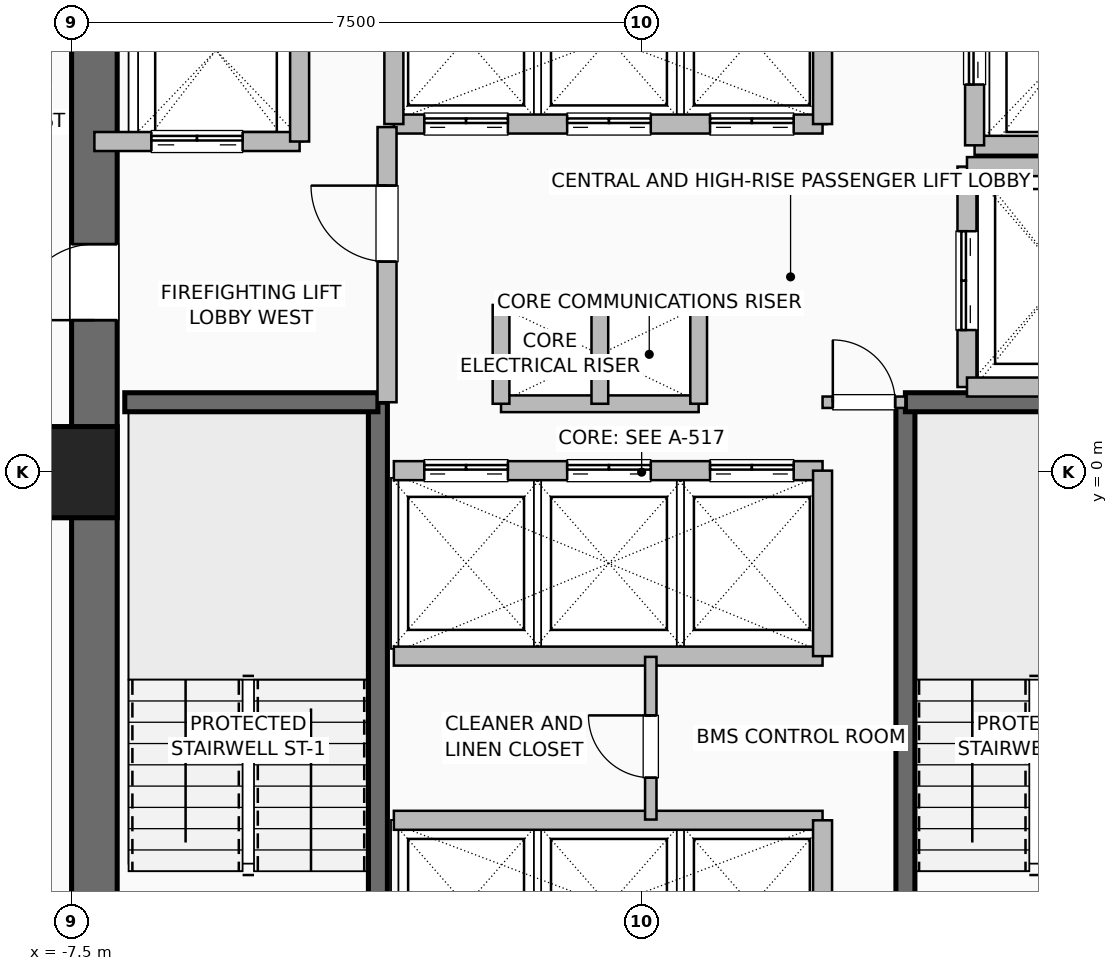
"""IFC4 building model, lengths in metres.
Left out: names, types, materials, properties, quantities, classifications, styles, units other than length and angle.
Written with IfcOpenShell. Run it as: python <this file> out.ifc"""

import sys

from ifc_helpers import new_model, si_unit, direction, frame, frame_2d, origin, origin_2d, place, context, subcontext, project, spatial, rectangle, hollow_rectangle, extrude, element, fill, save


model = new_model("IFC4")
c1 = context("Model", 3, precision=1e-05, world=origin(), true_north=direction((0.0, 1.0)))
c2 = subcontext(c1, "Body", "Model", "MODEL_VIEW")
j1 = project(units=[si_unit("LENGTHUNIT", "METRE"), si_unit("PLANEANGLEUNIT", "RADIAN")], contexts=[c1])
p1 = place(None, origin())
s1 = spatial("IfcSite", under=j1, at=p1, CompositionType="ELEMENT")
p2 = place(p1, origin())
s2 = spatial("IfcBuilding", under=s1, at=p2, CompositionType="ELEMENT")
p3 = place(p2, frame((0.0, 0.0, 65.5)))
s3 = spatial("IfcBuildingStorey", under=s2, at=p3, CompositionType="ELEMENT", Elevation=65.5)
p4 = place(p3, frame((-7.5, 0.0, 0.0), z_axis=(0.0, 0.0, 1.0), x_axis=(1.0, 0.0, 0.0)))
e1 = element("IfcColumn", 1, at=p4, inside=s3, PredefinedType="COLUMN", context=c2, shape_type="SweptSolid", body=[
    extrude(hollow_rectangle(XDim=1.2, YDim=1.2, WallThickness=0.055, at=origin_2d()), origin(), (0.0, 0.0, 1.0), 3.5),
])
p5 = place(p3, frame((-7.2, -7.5, 0.0), z_axis=(0.0, 0.0, 1.0), x_axis=(0.0, 1.0, 0.0)))
e2 = element("IfcWall", 2, at=p5, inside=s3, PredefinedType="SHEAR", context=c2, shape_type="SweptSolid", body=[
    extrude(rectangle(XDim=15.0, YDim=0.6, at=frame_2d((7.5, 0.0))), origin(), (0.0, 0.0, 1.0), 3.25),
])
p6 = place(p5, frame((9.5, 0.0, 0.0)))
e3 = element("IfcOpeningElement", 3, at=p6, cuts=e2, PredefinedType="OPENING", context=c2, shape_type="SweptSolid", body=[
    extrude(rectangle(XDim=1.0, YDim=2.08, at=frame_2d((0.5, 1.04))), frame((0.0, 0.31, 0.0), z_axis=(0.0, -1.0, 0.0), x_axis=(1.0, 0.0, 0.0)), (0.0, 0.0, 1.0), 0.62),
])
p7 = place(p3, frame((-3.47, -6.8, 0.0), z_axis=(0.0, 0.0, 1.0), x_axis=(0.0, 1.0, 0.0)))
e4 = element("IfcWall", 4, at=p7, inside=s3, PredefinedType="SHEAR", context=c2, shape_type="SweptSolid", body=[
    extrude(rectangle(XDim=7.72, YDim=0.25, at=frame_2d((3.86, 0.0))), origin(), (0.0, 0.0, 1.0), 3.25),
])
p8 = place(p3, frame((-6.8, 0.92, 0.0), z_axis=(0.0, 0.0, 1.0), x_axis=(1.0, 0.0, 0.0)))
e5 = element("IfcWall", 5, at=p8, inside=s3, PredefinedType="SHEAR", context=c2, shape_type="SweptSolid", body=[
    extrude(rectangle(XDim=3.33, YDim=0.25, at=frame_2d((1.665, 0.0))), origin(), (0.0, 0.0, 1.0), 3.25),
])
p9 = place(p3, frame((3.47, -6.8, 0.0), z_axis=(0.0, 0.0, 1.0), x_axis=(0.0, 1.0, 0.0)))
e6 = element("IfcWall", 6, at=p9, inside=s3, PredefinedType="SHEAR", context=c2, shape_type="SweptSolid", body=[
    extrude(rectangle(XDim=7.72, YDim=0.25, at=frame_2d((3.86, 0.0))), origin(), (0.0, 0.0, 1.0), 3.25),
])
p10 = place(p3, frame((3.47, 0.92, 0.0), z_axis=(0.0, 0.0, 1.0), x_axis=(1.0, 0.0, 0.0)))
e7 = element("IfcWall", 7, at=p10, inside=s3, PredefinedType="SHEAR", context=c2, shape_type="SweptSolid", body=[
    extrude(rectangle(XDim=3.33, YDim=0.25, at=frame_2d((1.665, 0.0))), origin(), (0.0, 0.0, 1.0), 3.25),
])
for number, where, z_axis, x_axis in (
    (8, (-1.85, 2.2, 0.0), (0.0, 0.0, 1.0), (1.0, 0.0, 0.0)),
    (9, (-1.85, 0.9, 0.0), (0.0, 0.0, 1.0), (1.0, 0.0, 0.0)),
):
    element("IfcWall", number, at=place(p3, frame(where, z_axis=z_axis, x_axis=x_axis)), inside=s3, PredefinedType="PARTITIONING", context=c2, shape_type="SweptSolid", body=[
        extrude(rectangle(XDim=2.6, YDim=0.22, at=frame_2d((1.3, 0.0))), origin(), (0.0, 0.0, 1.0), 3.25),
    ])
for number, where, z_axis, x_axis in (
    (10, (-0.55, 0.9, 0.0), (0.0, 0.0, 1.0), (0.0, 1.0, 0.0)),
    (11, (0.75, 0.9, 0.0), (0.0, 0.0, 1.0), (0.0, 1.0, 0.0)),
    (12, (-1.85, 0.9, 0.0), (0.0, 0.0, 1.0), (0.0, 1.0, 0.0)),
):
    element("IfcWall", number, at=place(p3, frame(where, z_axis=z_axis, x_axis=x_axis)), inside=s3, PredefinedType="PARTITIONING", context=c2, shape_type="SweptSolid", body=[
        extrude(rectangle(XDim=1.3, YDim=0.22, at=frame_2d((0.65, 0.0))), origin(), (0.0, 0.0, 1.0), 3.25),
    ])
p11 = place(p3, frame((-3.26, -4.58, 0.0), z_axis=(0.0, 0.0, 1.0), x_axis=(1.0, 0.0, 0.0)))
e13 = element("IfcWall", 13, at=p11, inside=s3, PredefinedType="SHEAR", context=c2, shape_type="SweptSolid", body=[
    extrude(rectangle(XDim=5.64, YDim=0.25, at=frame_2d((2.82, 0.0))), origin(), (0.0, 0.0, 1.0), 3.25),
])
p12 = place(p3, frame((2.38, -6.8, 0.0), z_axis=(0.0, 0.0, 1.0), x_axis=(0.0, 1.0, 0.0)))
e14 = element("IfcWall", 14, at=p12, inside=s3, PredefinedType="SHEAR", context=c2, shape_type="SweptSolid", body=[
    extrude(rectangle(XDim=2.22, YDim=0.25, at=frame_2d((1.11, 0.0))), origin(), (0.0, 0.0, 1.0), 3.25),
])
p13 = place(p3, frame((-3.26, 0.02, 0.0), z_axis=(0.0, 0.0, 1.0), x_axis=(1.0, 0.0, 0.0)))
e15 = element("IfcWall", 15, at=p13, inside=s3, PredefinedType="SHEAR", context=c2, shape_type="SweptSolid", body=[
    extrude(rectangle(XDim=5.64, YDim=0.25, at=frame_2d((2.82, 0.0))), origin(), (0.0, 0.0, 1.0), 3.25),
])
p14 = place(p13, frame((0.4, 0.0, 0.0)))
e16 = element("IfcOpeningElement", 16, at=p14, cuts=e15, PredefinedType="OPENING", context=c2, shape_type="SweptSolid", body=[
    extrude(rectangle(XDim=1.1, YDim=2.2, at=frame_2d((0.55, 1.1))), frame((0.0, 0.135, 0.0), z_axis=(0.0, -1.0, 0.0), x_axis=(1.0, 0.0, 0.0)), (0.0, 0.0, 1.0), 0.27),
])
p15 = place(p13, frame((2.28, 0.0, 0.0)))
e17 = element("IfcOpeningElement", 17, at=p15, cuts=e15, PredefinedType="OPENING", context=c2, shape_type="SweptSolid", body=[
    extrude(rectangle(XDim=1.1, YDim=2.2, at=frame_2d((0.55, 1.1))), frame((0.0, 0.135, 0.0), z_axis=(0.0, -1.0, 0.0), x_axis=(1.0, 0.0, 0.0)), (0.0, 0.0, 1.0), 0.27),
])
p16 = place(p13, frame((4.16, 0.0, 0.0)))
e18 = element("IfcOpeningElement", 18, at=p16, cuts=e15, PredefinedType="OPENING", context=c2, shape_type="SweptSolid", body=[
    extrude(rectangle(XDim=1.1, YDim=2.2, at=frame_2d((0.55, 1.1))), frame((0.0, 0.135, 0.0), z_axis=(0.0, -1.0, 0.0), x_axis=(1.0, 0.0, 0.0)), (0.0, 0.0, 1.0), 0.27),
])
p17 = place(p3, frame((-3.26, -2.42, 0.0), z_axis=(0.0, 0.0, 1.0), x_axis=(1.0, 0.0, 0.0)))
e19 = element("IfcWall", 19, at=p17, inside=s3, PredefinedType="SHEAR", context=c2, shape_type="SweptSolid", body=[
    extrude(rectangle(XDim=5.64, YDim=0.25, at=frame_2d((2.82, 0.0))), origin(), (0.0, 0.0, 1.0), 3.25),
])
p18 = place(p3, frame((2.38, -2.42, 0.0), z_axis=(0.0, 0.0, 1.0), x_axis=(0.0, 1.0, 0.0)))
e20 = element("IfcWall", 20, at=p18, inside=s3, PredefinedType="SHEAR", context=c2, shape_type="SweptSolid", body=[
    extrude(rectangle(XDim=2.44, YDim=0.25, at=frame_2d((1.22, 0.0))), origin(), (0.0, 0.0, 1.0), 3.25),
])
p19 = place(p3, frame((-3.26, 4.58, 0.0), z_axis=(0.0, 0.0, 1.0), x_axis=(1.0, 0.0, 0.0)))
e21 = element("IfcWall", 21, at=p19, inside=s3, PredefinedType="SHEAR", context=c2, shape_type="SweptSolid", body=[
    extrude(rectangle(XDim=5.64, YDim=0.25, at=frame_2d((2.82, 0.0))), origin(), (0.0, 0.0, 1.0), 3.25),
])
p20 = place(p19, frame((0.4, 0.0, 0.0)))
e22 = element("IfcOpeningElement", 22, at=p20, cuts=e21, PredefinedType="OPENING", context=c2, shape_type="SweptSolid", body=[
    extrude(rectangle(XDim=1.1, YDim=2.2, at=frame_2d((0.55, 1.1))), frame((0.0, 0.135, 0.0), z_axis=(0.0, -1.0, 0.0), x_axis=(1.0, 0.0, 0.0)), (0.0, 0.0, 1.0), 0.27),
])
p21 = place(p19, frame((2.28, 0.0, 0.0)))
e23 = element("IfcOpeningElement", 23, at=p21, cuts=e21, PredefinedType="OPENING", context=c2, shape_type="SweptSolid", body=[
    extrude(rectangle(XDim=1.1, YDim=2.2, at=frame_2d((0.55, 1.1))), frame((0.0, 0.135, 0.0), z_axis=(0.0, -1.0, 0.0), x_axis=(1.0, 0.0, 0.0)), (0.0, 0.0, 1.0), 0.27),
])
p22 = place(p19, frame((4.16, 0.0, 0.0)))
e24 = element("IfcOpeningElement", 24, at=p22, cuts=e21, PredefinedType="OPENING", context=c2, shape_type="SweptSolid", body=[
    extrude(rectangle(XDim=1.1, YDim=2.2, at=frame_2d((0.55, 1.1))), frame((0.0, 0.135, 0.0), z_axis=(0.0, -1.0, 0.0), x_axis=(1.0, 0.0, 0.0)), (0.0, 0.0, 1.0), 0.27),
])
for number, where, z_axis, x_axis in (
    (25, (-3.26, 4.58, 0.0), (0.0, 0.0, 1.0), (0.0, 1.0, 0.0)),
    (26, (2.38, 4.58, 0.0), (0.0, 0.0, 1.0), (0.0, 1.0, 0.0)),
):
    element("IfcWall", number, at=place(p3, frame(where, z_axis=z_axis, x_axis=x_axis)), inside=s3, PredefinedType="SHEAR", context=c2, shape_type="SweptSolid", body=[
        extrude(rectangle(XDim=2.22, YDim=0.25, at=frame_2d((1.11, 0.0))), origin(), (0.0, 0.0, 1.0), 3.25),
    ])
p23 = place(p3, frame((-7.2, 4.35, 0.0), z_axis=(0.0, 0.0, 1.0), x_axis=(1.0, 0.0, 0.0)))
e27 = element("IfcWall", 27, at=p23, inside=s3, PredefinedType="SHEAR", context=c2, shape_type="SweptSolid", body=[
    extrude(rectangle(XDim=2.7, YDim=0.25, at=frame_2d((1.35, 0.0))), origin(), (0.0, 0.0, 1.0), 3.25),
])
p24 = place(p23, frame((0.75, 0.0, 0.0)))
e28 = element("IfcOpeningElement", 28, at=p24, cuts=e27, PredefinedType="OPENING", context=c2, shape_type="SweptSolid", body=[
    extrude(rectangle(XDim=1.2, YDim=2.2, at=frame_2d((0.6, 1.1))), frame((0.0, 0.135, 0.0), z_axis=(0.0, -1.0, 0.0), x_axis=(1.0, 0.0, 0.0)), (0.0, 0.0, 1.0), 0.27),
])
p25 = place(p3, frame((-4.5, 4.35, 0.0), z_axis=(0.0, 0.0, 1.0), x_axis=(0.0, 1.0, 0.0)))
e29 = element("IfcWall", 29, at=p25, inside=s3, PredefinedType="SHEAR", context=c2, shape_type="SweptSolid", body=[
    extrude(rectangle(XDim=2.85, YDim=0.25, at=frame_2d((1.425, 0.0))), origin(), (0.0, 0.0, 1.0), 3.25),
])
p26 = place(p3, frame((4.38, 4.3, 0.0), z_axis=(0.0, 0.0, 1.0), x_axis=(1.0, 0.0, 0.0)))
e30 = element("IfcWall", 30, at=p26, inside=s3, PredefinedType="SHEAR", context=c2, shape_type="SweptSolid", body=[
    extrude(rectangle(XDim=2.42, YDim=0.25, at=frame_2d((1.21, 0.0))), origin(), (0.0, 0.0, 1.0), 3.25),
])
p27 = place(p3, frame((4.38, 4.3, 0.0), z_axis=(0.0, 0.0, 1.0), x_axis=(0.0, 1.0, 0.0)))
e31 = element("IfcWall", 31, at=p27, inside=s3, PredefinedType="SHEAR", context=c2, shape_type="SweptSolid", body=[
    extrude(rectangle(XDim=2.5, YDim=0.25, at=frame_2d((1.25, 0.0))), origin(), (0.0, 0.0, 1.0), 3.25),
])
p28 = place(p27, frame((0.8, 0.0, 0.0)))
e32 = element("IfcOpeningElement", 32, at=p28, cuts=e31, PredefinedType="OPENING", context=c2, shape_type="SweptSolid", body=[
    extrude(rectangle(XDim=1.2, YDim=2.2, at=frame_2d((0.6, 1.1))), frame((0.0, 0.135, 0.0), z_axis=(0.0, -1.0, 0.0), x_axis=(1.0, 0.0, 0.0)), (0.0, 0.0, 1.0), 0.27),
])
p29 = place(p3, frame((4.28, 1.12, 0.0), z_axis=(0.0, 0.0, 1.0), x_axis=(0.0, 1.0, 0.0)))
e33 = element("IfcWall", 33, at=p29, inside=s3, PredefinedType="SHEAR", context=c2, shape_type="SweptSolid", body=[
    extrude(rectangle(XDim=2.9, YDim=0.25, at=frame_2d((1.45, 0.0))), origin(), (0.0, 0.0, 1.0), 3.25),
])
p30 = place(p29, frame((0.75, 0.0, 0.0)))
e34 = element("IfcOpeningElement", 34, at=p30, cuts=e33, PredefinedType="OPENING", context=c2, shape_type="SweptSolid", body=[
    extrude(rectangle(XDim=1.3, YDim=2.3, at=frame_2d((0.65, 1.15))), frame((0.0, 0.135, 0.0), z_axis=(0.0, -1.0, 0.0), x_axis=(1.0, 0.0, 0.0)), (0.0, 0.0, 1.0), 0.27),
])
for number, where, z_axis, x_axis in (
    (35, (4.28, 1.12, 0.0), (0.0, 0.0, 1.0), (1.0, 0.0, 0.0)),
    (36, (4.28, 4.02, 0.0), (0.0, 0.0, 1.0), (1.0, 0.0, 0.0)),
):
    element("IfcWall", number, at=place(p3, frame(where, z_axis=z_axis, x_axis=x_axis)), inside=s3, PredefinedType="SHEAR", context=c2, shape_type="SweptSolid", body=[
        extrude(rectangle(XDim=2.52, YDim=0.25, at=frame_2d((1.26, 0.0))), origin(), (0.0, 0.0, 1.0), 3.25),
    ])
p31 = place(p3, frame((-3.35, 0.92, 0.0), z_axis=(0.0, 0.0, 1.0), x_axis=(0.0, 1.0, 0.0)))
e37 = element("IfcWall", 37, at=p31, inside=s3, PredefinedType="SHEAR", context=c2, shape_type="SweptSolid", body=[
    extrude(rectangle(XDim=3.62, YDim=0.25, at=frame_2d((1.81, 0.0))), origin(), (0.0, 0.0, 1.0), 3.25),
])
p32 = place(p31, frame((1.85, 0.0, 0.0)))
e38 = element("IfcOpeningElement", 38, at=p32, cuts=e37, PredefinedType="OPENING", context=c2, shape_type="SweptSolid", body=[
    extrude(rectangle(XDim=1.0, YDim=2.08, at=frame_2d((0.5, 1.04))), frame((0.0, 0.135, 0.0), z_axis=(0.0, -1.0, 0.0), x_axis=(1.0, 0.0, 0.0)), (0.0, 0.0, 1.0), 0.27),
])
p33 = place(p3, frame((2.38, 0.92, 0.0), z_axis=(0.0, 0.0, 1.0), x_axis=(1.0, 0.0, 0.0)))
e39 = element("IfcWall", 39, at=p33, inside=s3, PredefinedType="PARTITIONING", context=c2, shape_type="SweptSolid", body=[
    extrude(rectangle(XDim=1.09, YDim=0.15, at=frame_2d((0.545, 0.0))), origin(), (0.0, 0.0, 1.0), 3.25),
])
p34 = place(p33, frame((0.135, 0.0, 0.0)))
e40 = element("IfcOpeningElement", 40, at=p34, cuts=e39, PredefinedType="OPENING", context=c2, shape_type="SweptSolid", body=[
    extrude(rectangle(XDim=0.82, YDim=2.05, at=frame_2d((0.41, 1.025))), frame((0.0, 0.085, 0.0), z_axis=(0.0, -1.0, 0.0), x_axis=(1.0, 0.0, 0.0)), (0.0, 0.0, 1.0), 0.17),
])
p35 = place(p3, frame((0.12, -4.57, 0.0), z_axis=(0.0, 0.0, 1.0), x_axis=(0.0, 1.0, 0.0)))
e41 = element("IfcWall", 41, at=p35, inside=s3, PredefinedType="PARTITIONING", context=c2, shape_type="SweptSolid", body=[
    extrude(rectangle(XDim=2.14, YDim=0.15, at=frame_2d((1.07, 0.0))), origin(), (0.0, 0.0, 1.0), 3.25),
])
p36 = place(p35, frame((0.55, 0.0, 0.0)))
e42 = element("IfcOpeningElement", 42, at=p36, cuts=e41, PredefinedType="OPENING", context=c2, shape_type="SweptSolid", body=[
    extrude(rectangle(XDim=0.82, YDim=2.05, at=frame_2d((0.41, 1.025))), frame((0.0, 0.085, 0.0), z_axis=(0.0, -1.0, 0.0), x_axis=(1.0, 0.0, 0.0)), (0.0, 0.0, 1.0), 0.17),
])
p37 = place(p6, origin())
e43 = element("IfcDoor", 43, at=p37, inside=s3, OperationType="SINGLE_SWING_LEFT", PredefinedType="DOOR", context=c2, shape_type="SweptSolid", body=[
    extrude(rectangle(XDim=1.0, YDim=2.08, at=frame_2d((0.5, 1.04))), frame((0.0, 0.025, 0.0), z_axis=(0.0, -1.0, 0.0), x_axis=(1.0, 0.0, 0.0)), (0.0, 0.0, 1.0), 0.05),
])
fill(e3, e43)
p38 = place(p14, origin())
e44 = element("IfcDoor", 44, at=p38, inside=s3, OperationType="DOUBLE_DOOR_SLIDING", PredefinedType="DOOR", context=c2, shape_type="SweptSolid", body=[
    extrude(rectangle(XDim=1.1, YDim=2.2, at=frame_2d((0.55, 1.1))), frame((0.0, 0.025, 0.0), z_axis=(0.0, -1.0, 0.0), x_axis=(1.0, 0.0, 0.0)), (0.0, 0.0, 1.0), 0.05),
])
fill(e16, e44)
p39 = place(p15, origin())
e45 = element("IfcDoor", 45, at=p39, inside=s3, OperationType="DOUBLE_DOOR_SLIDING", PredefinedType="DOOR", context=c2, shape_type="SweptSolid", body=[
    extrude(rectangle(XDim=1.1, YDim=2.2, at=frame_2d((0.55, 1.1))), frame((0.0, 0.025, 0.0), z_axis=(0.0, -1.0, 0.0), x_axis=(1.0, 0.0, 0.0)), (0.0, 0.0, 1.0), 0.05),
])
fill(e17, e45)
p40 = place(p16, origin())
e46 = element("IfcDoor", 46, at=p40, inside=s3, OperationType="DOUBLE_DOOR_SLIDING", PredefinedType="DOOR", context=c2, shape_type="SweptSolid", body=[
    extrude(rectangle(XDim=1.1, YDim=2.2, at=frame_2d((0.55, 1.1))), frame((0.0, 0.025, 0.0), z_axis=(0.0, -1.0, 0.0), x_axis=(1.0, 0.0, 0.0)), (0.0, 0.0, 1.0), 0.05),
])
fill(e18, e46)
p41 = place(p20, origin())
e47 = element("IfcDoor", 47, at=p41, inside=s3, OperationType="DOUBLE_DOOR_SLIDING", PredefinedType="DOOR", context=c2, shape_type="SweptSolid", body=[
    extrude(rectangle(XDim=1.1, YDim=2.2, at=frame_2d((0.55, 1.1))), frame((0.0, 0.025, 0.0), z_axis=(0.0, -1.0, 0.0), x_axis=(1.0, 0.0, 0.0)), (0.0, 0.0, 1.0), 0.05),
])
fill(e22, e47)
p42 = place(p21, origin())
e48 = element("IfcDoor", 48, at=p42, inside=s3, OperationType="DOUBLE_DOOR_SLIDING", PredefinedType="DOOR", context=c2, shape_type="SweptSolid", body=[
    extrude(rectangle(XDim=1.1, YDim=2.2, at=frame_2d((0.55, 1.1))), frame((0.0, 0.025, 0.0), z_axis=(0.0, -1.0, 0.0), x_axis=(1.0, 0.0, 0.0)), (0.0, 0.0, 1.0), 0.05),
])
fill(e23, e48)
p43 = place(p22, origin())
e49 = element("IfcDoor", 49, at=p43, inside=s3, OperationType="DOUBLE_DOOR_SLIDING", PredefinedType="DOOR", context=c2, shape_type="SweptSolid", body=[
    extrude(rectangle(XDim=1.1, YDim=2.2, at=frame_2d((0.55, 1.1))), frame((0.0, 0.025, 0.0), z_axis=(0.0, -1.0, 0.0), x_axis=(1.0, 0.0, 0.0)), (0.0, 0.0, 1.0), 0.05),
])
fill(e24, e49)
p44 = place(p24, origin())
e50 = element("IfcDoor", 50, at=p44, inside=s3, OperationType="DOUBLE_DOOR_SLIDING", PredefinedType="DOOR", context=c2, shape_type="SweptSolid", body=[
    extrude(rectangle(XDim=1.2, YDim=2.2, at=frame_2d((0.6, 1.1))), frame((0.0, 0.025, 0.0), z_axis=(0.0, -1.0, 0.0), x_axis=(1.0, 0.0, 0.0)), (0.0, 0.0, 1.0), 0.05),
])
fill(e28, e50)
p45 = place(p28, origin())
e51 = element("IfcDoor", 51, at=p45, inside=s3, OperationType="DOUBLE_DOOR_SLIDING", PredefinedType="DOOR", context=c2, shape_type="SweptSolid", body=[
    extrude(rectangle(XDim=1.2, YDim=2.2, at=frame_2d((0.6, 1.1))), frame((0.0, 0.025, 0.0), z_axis=(0.0, -1.0, 0.0), x_axis=(1.0, 0.0, 0.0)), (0.0, 0.0, 1.0), 0.05),
])
fill(e32, e51)
p46 = place(p30, origin())
e52 = element("IfcDoor", 52, at=p46, inside=s3, OperationType="DOUBLE_DOOR_SLIDING", PredefinedType="DOOR", context=c2, shape_type="SweptSolid", body=[
    extrude(rectangle(XDim=1.3, YDim=2.3, at=frame_2d((0.65, 1.15))), frame((0.0, 0.025, 0.0), z_axis=(0.0, -1.0, 0.0), x_axis=(1.0, 0.0, 0.0)), (0.0, 0.0, 1.0), 0.05),
])
fill(e34, e52)
p47 = place(p32, origin())
e53 = element("IfcDoor", 53, at=p47, inside=s3, OperationType="SINGLE_SWING_RIGHT", PredefinedType="DOOR", context=c2, shape_type="SweptSolid", body=[
    extrude(rectangle(XDim=1.0, YDim=2.08, at=frame_2d((0.5, 1.04))), frame((0.0, 0.025, 0.0), z_axis=(0.0, -1.0, 0.0), x_axis=(1.0, 0.0, 0.0)), (0.0, 0.0, 1.0), 0.05),
])
fill(e38, e53)
p48 = place(p34, origin())
e54 = element("IfcDoor", 54, at=p48, inside=s3, OperationType="SINGLE_SWING_LEFT", PredefinedType="DOOR", context=c2, shape_type="SweptSolid", body=[
    extrude(rectangle(XDim=0.82, YDim=2.05, at=frame_2d((0.41, 1.025))), frame((0.0, 0.025, 0.0), z_axis=(0.0, -1.0, 0.0), x_axis=(1.0, 0.0, 0.0)), (0.0, 0.0, 1.0), 0.05),
])
fill(e40, e54)
p49 = place(p36, origin())
e55 = element("IfcDoor", 55, at=p49, inside=s3, OperationType="SINGLE_SWING_RIGHT", PredefinedType="DOOR", context=c2, shape_type="SweptSolid", body=[
    extrude(rectangle(XDim=0.82, YDim=2.05, at=frame_2d((0.41, 1.025))), frame((0.0, 0.025, 0.0), z_axis=(0.0, -1.0, 0.0), x_axis=(1.0, 0.0, 0.0)), (0.0, 0.0, 1.0), 0.05),
])
fill(e42, e55)
save(model, sys.argv[1])
